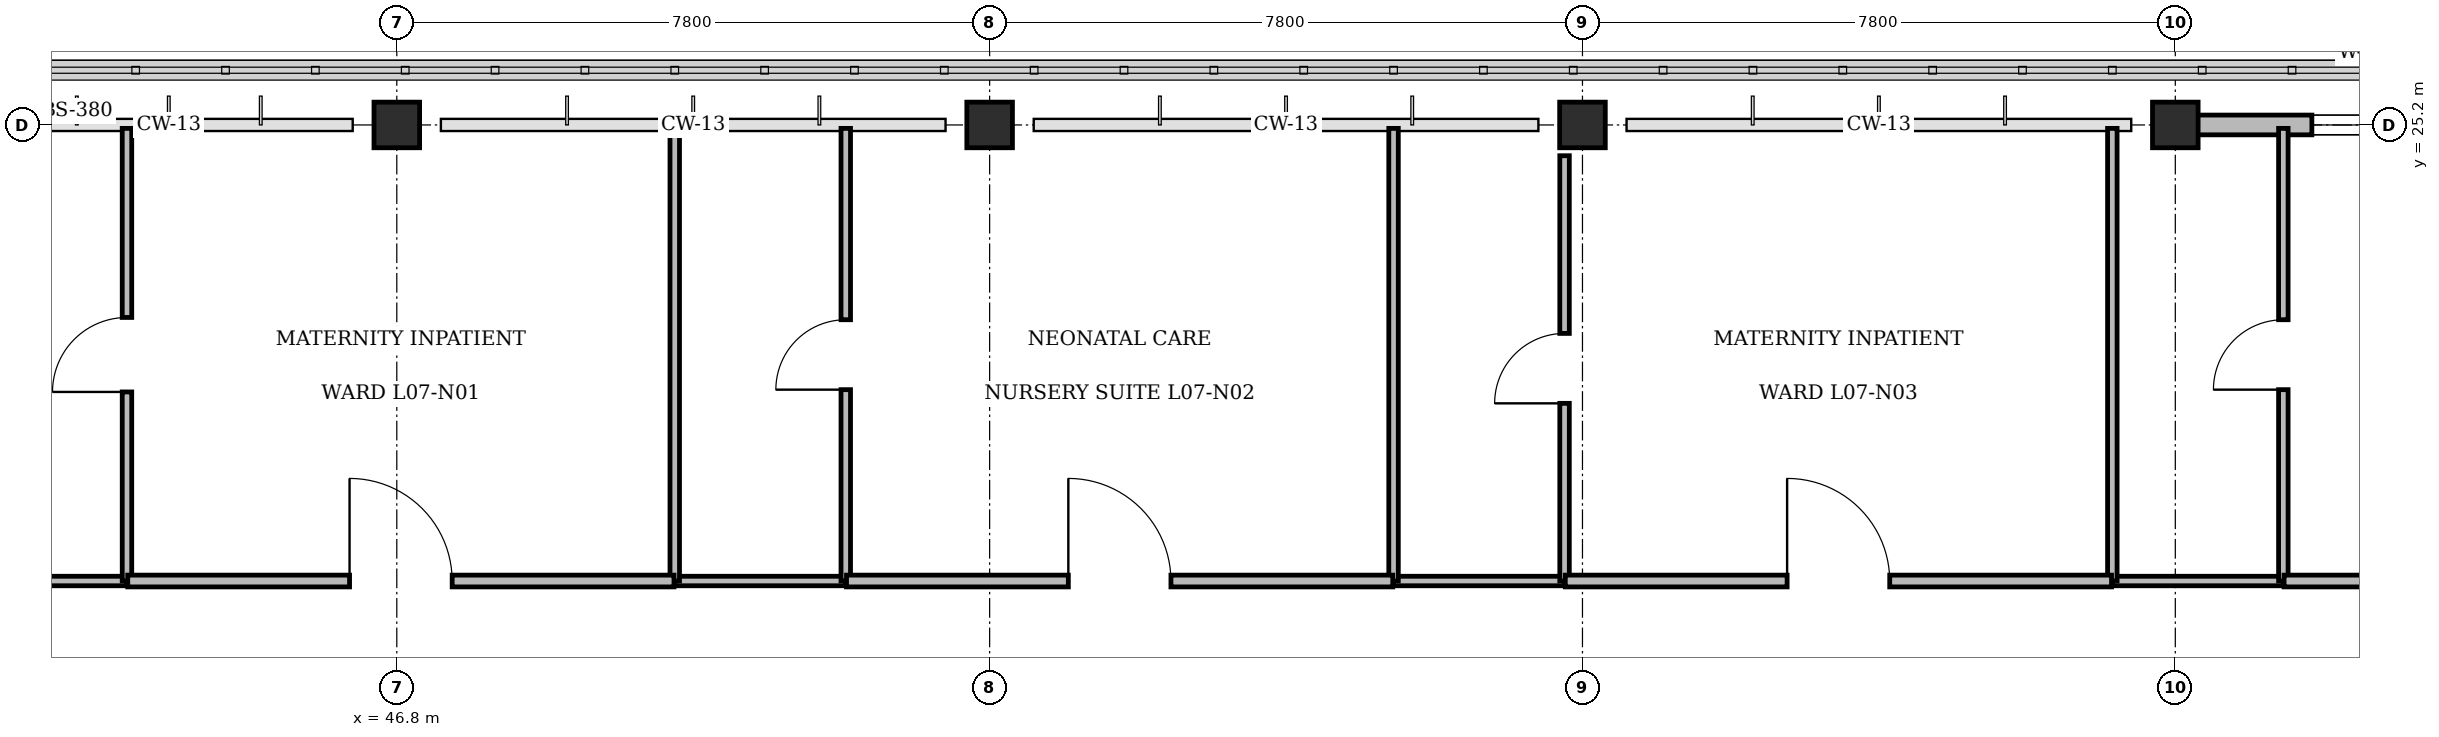
"""IFC4 building model, lengths in metres.
Left out: names, types, materials, properties, quantities, classifications, styles, units other than length and angle.
Written with IfcOpenShell. Run it as: python <this file> out.ifc"""

import sys

from ifc_helpers import new_model, si_unit, direction, frame, frame_2d, origin, origin_2d, place, context, subcontext, project, spatial, rectangle, extrude, element, fill, save


model = new_model("IFC4")
c1 = context("Model", 3, precision=1e-05, world=origin(), true_north=direction((0.0, 1.0)))
c2 = subcontext(c1, "Body", "Model", "MODEL_VIEW")
j1 = project(units=[si_unit("LENGTHUNIT", "METRE"), si_unit("PLANEANGLEUNIT", "RADIAN")], contexts=[c1])
p1 = place(None, origin())
s1 = spatial("IfcSite", under=j1, at=p1, CompositionType="ELEMENT")
p2 = place(p1, origin())
s2 = spatial("IfcBuilding", under=s1, at=p2, CompositionType="ELEMENT")
p3 = place(p2, frame((0.0, 0.0, 30.6)))
s3 = spatial("IfcBuildingStorey", under=s2, at=p3, CompositionType="ELEMENT", Elevation=30.6)
for number, where, z_axis, x_axis in (
    (1, (46.8, 25.2, 0.0), (0.0, 0.0, 1.0), (1.0, 0.0, 0.0)),
    (2, (54.6, 25.2, 0.0), (0.0, 0.0, 1.0), (1.0, 0.0, 0.0)),
    (3, (62.4, 25.2, 0.0), (0.0, 0.0, 1.0), (1.0, 0.0, 0.0)),
    (4, (70.2, 25.2, 0.0), (0.0, 0.0, 1.0), (1.0, 0.0, 0.0)),
):
    element("IfcColumn", number, at=place(p3, frame(where, z_axis=z_axis, x_axis=x_axis)), inside=s3, PredefinedType="COLUMN", context=c2, shape_type="SweptSolid", body=[
        extrude(rectangle(XDim=0.6, YDim=0.6, at=origin_2d()), origin(), (0.0, 0.0, 1.0), 4.2),
    ])
p4 = place(p3, frame((70.49, 25.2, 0.0), z_axis=(0.0, 0.0, 1.0), x_axis=(1.0, 0.0, 0.0)))
e5 = element("IfcWall", 5, at=p4, inside=s3, PredefinedType="STANDARD", context=c2, shape_type="SweptSolid", body=[
    extrude(rectangle(XDim=7.22, YDim=0.26, at=frame_2d((3.61, 0.0))), origin(), (0.0, 0.0, 1.0), 3.305),
])
p5 = place(p4, frame((1.507, 0.0, 0.85)))
e6 = element("IfcOpeningElement", 6, at=p5, cuts=e5, PredefinedType="OPENING", context=c2, shape_type="SweptSolid", body=[
    extrude(rectangle(XDim=1.35, YDim=1.45, at=frame_2d((0.675, 0.725))), frame((0.0, 0.14, 0.0), z_axis=(0.0, -1.0, 0.0), x_axis=(1.0, 0.0, 0.0)), (0.0, 0.0, 1.0), 0.28),
])
p6 = place(p4, frame((4.363, 0.0, 0.85)))
e7 = element("IfcOpeningElement", 7, at=p6, cuts=e5, PredefinedType="OPENING", context=c2, shape_type="SweptSolid", body=[
    extrude(rectangle(XDim=1.35, YDim=1.45, at=frame_2d((0.675, 0.725))), frame((0.0, 0.14, 0.0), z_axis=(0.0, -1.0, 0.0), x_axis=(1.0, 0.0, 0.0)), (0.0, 0.0, 1.0), 0.28),
])
p7 = place(p3, frame((41.0, 19.2, 0.0), z_axis=(0.0, 0.0, 1.0), x_axis=(1.0, 0.0, 0.0)))
e8 = element("IfcWall", 8, at=p7, inside=s3, PredefinedType="PARTITIONING", context=c2, shape_type="SweptSolid", body=[
    extrude(rectangle(XDim=2.25, YDim=0.125, at=frame_2d((1.125, 0.0))), origin(), (0.0, 0.0, 1.0), 3.9),
])
p8 = place(p3, frame((43.25, 19.2, 0.0), z_axis=(0.0, 0.0, 1.0), x_axis=(0.0, 1.0, 0.0)))
e9 = element("IfcWall", 9, at=p8, inside=s3, PredefinedType="PARTITIONING", context=c2, shape_type="SweptSolid", body=[
    extrude(rectangle(XDim=5.955, YDim=0.125, at=frame_2d((2.978, 0.0))), origin(), (0.0, 0.0, 1.0), 3.9),
])
p9 = place(p8, frame((2.488, 0.0, 0.0)))
e10 = element("IfcOpeningElement", 10, at=p9, cuts=e9, PredefinedType="OPENING", context=c2, shape_type="SweptSolid", body=[
    extrude(rectangle(XDim=0.98, YDim=2.1, at=frame_2d((0.49, 1.05))), frame((0.0, 0.073, 0.0), z_axis=(0.0, -1.0, 0.0), x_axis=(1.0, 0.0, 0.0)), (0.0, 0.0, 1.0), 0.145),
])
p10 = place(p3, frame((50.457, 19.2, 0.0), z_axis=(0.0, 0.0, 1.0), x_axis=(1.0, 0.0, 0.0)))
e11 = element("IfcWall", 11, at=p10, inside=s3, PredefinedType="PARTITIONING", context=c2, shape_type="SweptSolid", body=[
    extrude(rectangle(XDim=2.25, YDim=0.125, at=frame_2d((1.125, 0.0))), origin(), (0.0, 0.0, 1.0), 3.9),
])
p11 = place(p3, frame((50.457, 19.2, 0.0), z_axis=(0.0, 0.0, 1.0), x_axis=(0.0, 1.0, 0.0)))
e12 = element("IfcWall", 12, at=p11, inside=s3, PredefinedType="PARTITIONING", context=c2, shape_type="SweptSolid", body=[
    extrude(rectangle(XDim=5.955, YDim=0.125, at=frame_2d((2.978, 0.0))), origin(), (0.0, 0.0, 1.0), 3.9),
])
p12 = place(p3, frame((52.707, 19.2, 0.0), z_axis=(0.0, 0.0, 1.0), x_axis=(0.0, 1.0, 0.0)))
e13 = element("IfcWall", 13, at=p12, inside=s3, PredefinedType="PARTITIONING", context=c2, shape_type="SweptSolid", body=[
    extrude(rectangle(XDim=5.955, YDim=0.125, at=frame_2d((2.978, 0.0))), origin(), (0.0, 0.0, 1.0), 3.9),
])
p13 = place(p12, frame((2.518, 0.0, 0.0)))
e14 = element("IfcOpeningElement", 14, at=p13, cuts=e13, PredefinedType="OPENING", context=c2, shape_type="SweptSolid", body=[
    extrude(rectangle(XDim=0.92, YDim=2.1, at=frame_2d((0.46, 1.05))), frame((0.0, 0.073, 0.0), z_axis=(0.0, -1.0, 0.0), x_axis=(1.0, 0.0, 0.0)), (0.0, 0.0, 1.0), 0.145),
])
p14 = place(p3, frame((59.914, 19.2, 0.0), z_axis=(0.0, 0.0, 1.0), x_axis=(1.0, 0.0, 0.0)))
e15 = element("IfcWall", 15, at=p14, inside=s3, PredefinedType="PARTITIONING", context=c2, shape_type="SweptSolid", body=[
    extrude(rectangle(XDim=2.25, YDim=0.125, at=frame_2d((1.125, 0.0))), origin(), (0.0, 0.0, 1.0), 3.9),
])
p15 = place(p3, frame((59.914, 19.2, 0.0), z_axis=(0.0, 0.0, 1.0), x_axis=(0.0, 1.0, 0.0)))
e16 = element("IfcWall", 16, at=p15, inside=s3, PredefinedType="PARTITIONING", context=c2, shape_type="SweptSolid", body=[
    extrude(rectangle(XDim=5.955, YDim=0.125, at=frame_2d((2.978, 0.0))), origin(), (0.0, 0.0, 1.0), 3.9),
])
p16 = place(p3, frame((62.164, 19.2, 0.0), z_axis=(0.0, 0.0, 1.0), x_axis=(0.0, 1.0, 0.0)))
e17 = element("IfcWall", 17, at=p16, inside=s3, PredefinedType="PARTITIONING", context=c2, shape_type="SweptSolid", body=[
    extrude(rectangle(XDim=5.595, YDim=0.125, at=frame_2d((2.797, 0.0))), origin(), (0.0, 0.0, 1.0), 3.305),
])
p17 = place(p16, frame((2.337, 0.0, 0.0)))
e18 = element("IfcOpeningElement", 18, at=p17, cuts=e17, PredefinedType="OPENING", context=c2, shape_type="SweptSolid", body=[
    extrude(rectangle(XDim=0.92, YDim=2.1, at=frame_2d((0.46, 1.05))), frame((0.0, 0.073, 0.0), z_axis=(0.0, -1.0, 0.0), x_axis=(1.0, 0.0, 0.0)), (0.0, 0.0, 1.0), 0.145),
])
p18 = place(p3, frame((69.371, 19.2, 0.0), z_axis=(0.0, 0.0, 1.0), x_axis=(1.0, 0.0, 0.0)))
e19 = element("IfcWall", 19, at=p18, inside=s3, PredefinedType="PARTITIONING", context=c2, shape_type="SweptSolid", body=[
    extrude(rectangle(XDim=2.25, YDim=0.125, at=frame_2d((1.125, 0.0))), origin(), (0.0, 0.0, 1.0), 3.9),
])
p19 = place(p3, frame((69.371, 19.2, 0.0), z_axis=(0.0, 0.0, 1.0), x_axis=(0.0, 1.0, 0.0)))
e20 = element("IfcWall", 20, at=p19, inside=s3, PredefinedType="PARTITIONING", context=c2, shape_type="SweptSolid", body=[
    extrude(rectangle(XDim=5.955, YDim=0.125, at=frame_2d((2.978, 0.0))), origin(), (0.0, 0.0, 1.0), 3.9),
])
p20 = place(p3, frame((71.621, 19.2, 0.0), z_axis=(0.0, 0.0, 1.0), x_axis=(0.0, 1.0, 0.0)))
e21 = element("IfcWall", 21, at=p20, inside=s3, PredefinedType="PARTITIONING", context=c2, shape_type="SweptSolid", body=[
    extrude(rectangle(XDim=5.955, YDim=0.125, at=frame_2d((2.978, 0.0))), origin(), (0.0, 0.0, 1.0), 3.9),
])
p21 = place(p20, frame((2.518, 0.0, 0.0)))
e22 = element("IfcOpeningElement", 22, at=p21, cuts=e21, PredefinedType="OPENING", context=c2, shape_type="SweptSolid", body=[
    extrude(rectangle(XDim=0.92, YDim=2.1, at=frame_2d((0.46, 1.05))), frame((0.0, 0.073, 0.0), z_axis=(0.0, -1.0, 0.0), x_axis=(1.0, 0.0, 0.0)), (0.0, 0.0, 1.0), 0.145),
])
p22 = place(p3, frame((43.26, 19.2, 0.0), z_axis=(0.0, 0.0, 1.0), x_axis=(1.0, 0.0, 0.0)))
e23 = element("IfcWall", 23, at=p22, inside=s3, PredefinedType="PARTITIONING", context=c2, shape_type="SweptSolid", body=[
    extrude(rectangle(XDim=7.187, YDim=0.155, at=frame_2d((3.594, 0.0))), origin(), (0.0, 0.0, 1.0), 3.9),
])
p23 = place(p22, frame((2.918, 0.0, 0.0)))
e24 = element("IfcOpeningElement", 24, at=p23, cuts=e23, PredefinedType="OPENING", context=c2, shape_type="SweptSolid", body=[
    extrude(rectangle(XDim=1.35, YDim=2.2, at=frame_2d((0.675, 1.1))), frame((0.0, 0.087, 0.0), z_axis=(0.0, -1.0, 0.0), x_axis=(1.0, 0.0, 0.0)), (0.0, 0.0, 1.0), 0.175),
])
p24 = place(p3, frame((52.717, 19.2, 0.0), z_axis=(0.0, 0.0, 1.0), x_axis=(1.0, 0.0, 0.0)))
e25 = element("IfcWall", 25, at=p24, inside=s3, PredefinedType="PARTITIONING", context=c2, shape_type="SweptSolid", body=[
    extrude(rectangle(XDim=7.187, YDim=0.155, at=frame_2d((3.594, 0.0))), origin(), (0.0, 0.0, 1.0), 3.9),
])
p25 = place(p24, frame((2.918, 0.0, 0.0)))
e26 = element("IfcOpeningElement", 26, at=p25, cuts=e25, PredefinedType="OPENING", context=c2, shape_type="SweptSolid", body=[
    extrude(rectangle(XDim=1.35, YDim=2.2, at=frame_2d((0.675, 1.1))), frame((0.0, 0.087, 0.0), z_axis=(0.0, -1.0, 0.0), x_axis=(1.0, 0.0, 0.0)), (0.0, 0.0, 1.0), 0.175),
])
p26 = place(p3, frame((62.174, 19.2, 0.0), z_axis=(0.0, 0.0, 1.0), x_axis=(1.0, 0.0, 0.0)))
e27 = element("IfcWall", 27, at=p26, inside=s3, PredefinedType="PARTITIONING", context=c2, shape_type="SweptSolid", body=[
    extrude(rectangle(XDim=7.187, YDim=0.155, at=frame_2d((3.594, 0.0))), origin(), (0.0, 0.0, 1.0), 3.9),
])
p27 = place(p26, frame((2.918, 0.0, 0.0)))
e28 = element("IfcOpeningElement", 28, at=p27, cuts=e27, PredefinedType="OPENING", context=c2, shape_type="SweptSolid", body=[
    extrude(rectangle(XDim=1.35, YDim=2.2, at=frame_2d((0.675, 1.1))), frame((0.0, 0.087, 0.0), z_axis=(0.0, -1.0, 0.0), x_axis=(1.0, 0.0, 0.0)), (0.0, 0.0, 1.0), 0.175),
])
p28 = place(p3, frame((71.631, 19.2, 0.0), z_axis=(0.0, 0.0, 1.0), x_axis=(1.0, 0.0, 0.0)))
e29 = element("IfcWall", 29, at=p28, inside=s3, PredefinedType="PARTITIONING", context=c2, shape_type="SweptSolid", body=[
    extrude(rectangle(XDim=7.188, YDim=0.155, at=frame_2d((3.594, 0.0))), origin(), (0.0, 0.0, 1.0), 3.9),
])
p29 = place(p28, frame((2.919, 0.0, 0.0)))
e30 = element("IfcOpeningElement", 30, at=p29, cuts=e29, PredefinedType="OPENING", context=c2, shape_type="SweptSolid", body=[
    extrude(rectangle(XDim=1.35, YDim=2.2, at=frame_2d((0.675, 1.1))), frame((0.0, 0.087, 0.0), z_axis=(0.0, -1.0, 0.0), x_axis=(1.0, 0.0, 0.0)), (0.0, 0.0, 1.0), 0.175),
])
p30 = place(p5, origin())
e31 = element("IfcWindow", 31, at=p30, inside=s3, PartitioningType="SINGLE_PANEL", PredefinedType="WINDOW", context=c2, shape_type="SweptSolid", body=[
    extrude(rectangle(XDim=1.35, YDim=1.45, at=frame_2d((0.675, 0.725))), frame((0.0, 0.03, 0.0), z_axis=(0.0, -1.0, 0.0), x_axis=(1.0, 0.0, 0.0)), (0.0, 0.0, 1.0), 0.06),
])
fill(e6, e31)
p31 = place(p9, origin())
e32 = element("IfcDoor", 32, at=p31, inside=s3, OperationType="SINGLE_SWING_LEFT", PredefinedType="DOOR", context=c2, shape_type="SweptSolid", body=[
    extrude(rectangle(XDim=0.98, YDim=2.1, at=frame_2d((0.49, 1.05))), frame((0.0, 0.025, 0.0), z_axis=(0.0, -1.0, 0.0), x_axis=(1.0, 0.0, 0.0)), (0.0, 0.0, 1.0), 0.05),
])
fill(e10, e32)
p32 = place(p13, origin())
e33 = element("IfcDoor", 33, at=p32, inside=s3, OperationType="SINGLE_SWING_LEFT", PredefinedType="DOOR", context=c2, shape_type="SweptSolid", body=[
    extrude(rectangle(XDim=0.92, YDim=2.1, at=frame_2d((0.46, 1.05))), frame((0.0, 0.025, 0.0), z_axis=(0.0, -1.0, 0.0), x_axis=(1.0, 0.0, 0.0)), (0.0, 0.0, 1.0), 0.05),
])
fill(e14, e33)
p33 = place(p17, origin())
e34 = element("IfcDoor", 34, at=p33, inside=s3, OperationType="SINGLE_SWING_LEFT", PredefinedType="DOOR", context=c2, shape_type="SweptSolid", body=[
    extrude(rectangle(XDim=0.92, YDim=2.1, at=frame_2d((0.46, 1.05))), frame((0.0, 0.025, 0.0), z_axis=(0.0, -1.0, 0.0), x_axis=(1.0, 0.0, 0.0)), (0.0, 0.0, 1.0), 0.05),
])
fill(e18, e34)
p34 = place(p21, origin())
e35 = element("IfcDoor", 35, at=p34, inside=s3, OperationType="SINGLE_SWING_LEFT", PredefinedType="DOOR", context=c2, shape_type="SweptSolid", body=[
    extrude(rectangle(XDim=0.92, YDim=2.1, at=frame_2d((0.46, 1.05))), frame((0.0, 0.025, 0.0), z_axis=(0.0, -1.0, 0.0), x_axis=(1.0, 0.0, 0.0)), (0.0, 0.0, 1.0), 0.05),
])
fill(e22, e35)
p35 = place(p23, origin())
e36 = element("IfcDoor", 36, at=p35, inside=s3, OperationType="SINGLE_SWING_LEFT", PredefinedType="DOOR", context=c2, shape_type="SweptSolid", body=[
    extrude(rectangle(XDim=1.35, YDim=2.2, at=frame_2d((0.675, 1.1))), frame((0.0, 0.025, 0.0), z_axis=(0.0, -1.0, 0.0), x_axis=(1.0, 0.0, 0.0)), (0.0, 0.0, 1.0), 0.05),
])
fill(e24, e36)
p36 = place(p25, origin())
e37 = element("IfcDoor", 37, at=p36, inside=s3, OperationType="SINGLE_SWING_LEFT", PredefinedType="DOOR", context=c2, shape_type="SweptSolid", body=[
    extrude(rectangle(XDim=1.35, YDim=2.2, at=frame_2d((0.675, 1.1))), frame((0.0, 0.025, 0.0), z_axis=(0.0, -1.0, 0.0), x_axis=(1.0, 0.0, 0.0)), (0.0, 0.0, 1.0), 0.05),
])
fill(e26, e37)
p37 = place(p27, origin())
e38 = element("IfcDoor", 38, at=p37, inside=s3, OperationType="SINGLE_SWING_LEFT", PredefinedType="DOOR", context=c2, shape_type="SweptSolid", body=[
    extrude(rectangle(XDim=1.35, YDim=2.2, at=frame_2d((0.675, 1.1))), frame((0.0, 0.025, 0.0), z_axis=(0.0, -1.0, 0.0), x_axis=(1.0, 0.0, 0.0)), (0.0, 0.0, 1.0), 0.05),
])
fill(e28, e38)
save(model, sys.argv[1])
